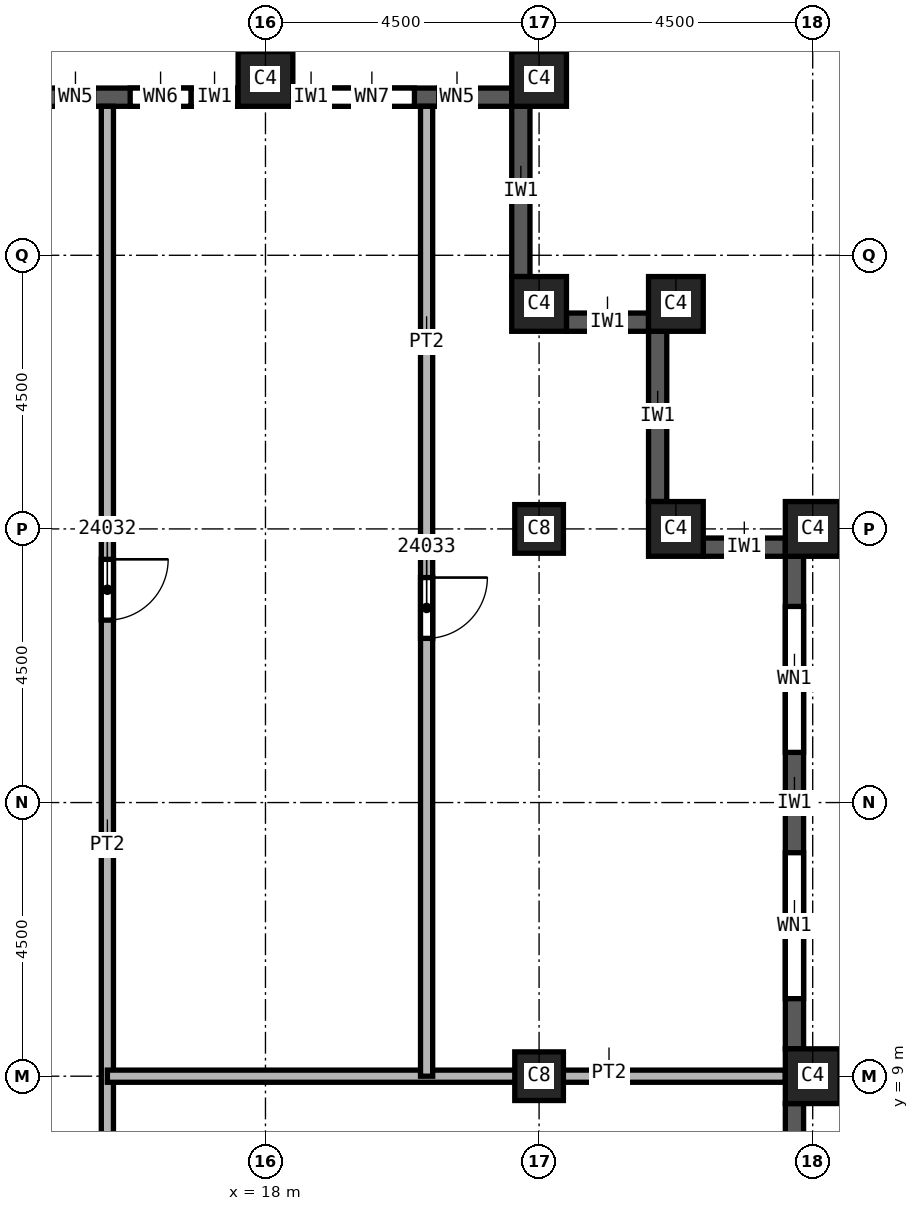
"""IFC4 building model, lengths in metres.
Left out: names, types, materials, properties, quantities, classifications, styles, units other than length and angle.
Written with IfcOpenShell. Run it as: python <this file> out.ifc"""

import sys

from ifc_helpers import new_model, si_unit, direction, frame, frame_2d, origin, origin_2d, place, context, subcontext, project, spatial, rectangle, extrude, element, fill, save


model = new_model("IFC4")
c1 = context("Model", 3, precision=1e-05, world=origin(), true_north=direction((0.0, 1.0)))
c2 = subcontext(c1, "Body", "Model", "MODEL_VIEW")
j1 = project(units=[si_unit("LENGTHUNIT", "METRE"), si_unit("PLANEANGLEUNIT", "RADIAN")], contexts=[c1])
p1 = place(None, origin())
s1 = spatial("IfcSite", under=j1, at=p1, CompositionType="ELEMENT")
p2 = place(p1, origin())
s2 = spatial("IfcBuilding", under=s1, at=p2, CompositionType="ELEMENT")
p3 = place(p2, frame((0.0, 0.0, 338.0)))
s3 = spatial("IfcBuildingStorey", under=s2, at=p3, CompositionType="ELEMENT", Elevation=338.0)
for number, where, z_axis, x_axis in (
    (1, (22.5, 9.0, 0.0), (0.0, 0.0, 1.0), (1.0, 0.0, 0.0)),
    (2, (22.5, 18.0, 0.0), (0.0, 0.0, 1.0), (1.0, 0.0, 0.0)),
):
    element("IfcColumn", number, at=place(p3, frame(where, z_axis=z_axis, x_axis=x_axis)), inside=s3, PredefinedType="COLUMN", context=c2, shape_type="SweptSolid", body=[
        extrude(rectangle(XDim=0.8, YDim=0.8, at=origin_2d()), origin(), (0.0, 0.0, 1.0), 3.74),
    ])
for number, where, z_axis, x_axis in (
    (3, (27.0, 9.0, 0.0), (0.0, 0.0, 1.0), (0.0, 1.0, 0.0)),
    (4, (27.0, 18.0, 0.0), (0.0, 0.0, 1.0), (0.0, 1.0, 0.0)),
    (5, (18.0, 25.4, 0.0), (0.0, 0.0, 1.0), (1.0, 0.0, 0.0)),
    (6, (22.5, 25.4, 0.0), (0.0, 0.0, 1.0), (1.0, 0.0, 0.0)),
    (7, (22.5, 21.7, 0.0), (0.0, 0.0, 1.0), (1.0, 0.0, 0.0)),
    (8, (24.75, 21.7, 0.0), (0.0, 0.0, 1.0), (1.0, 0.0, 0.0)),
    (9, (24.75, 18.0, 0.0), (0.0, 0.0, 1.0), (1.0, 0.0, 0.0)),
):
    element("IfcColumn", number, at=place(p3, frame(where, z_axis=z_axis, x_axis=x_axis)), inside=s3, PredefinedType="COLUMN", context=c2, shape_type="SweptSolid", body=[
        extrude(rectangle(XDim=0.9, YDim=0.9, at=origin_2d()), origin(), (0.0, 0.0, 1.0), 3.74),
    ])
p4 = place(p3, frame((26.7, 0.45, 0.0), z_axis=(0.0, 0.0, 1.0), x_axis=(0.0, 1.0, 0.0)))
e10 = element("IfcWall", 10, at=p4, inside=s3, PredefinedType="SOLIDWALL", context=c2, shape_type="SweptSolid", body=[
    extrude(rectangle(XDim=8.1, YDim=0.3, at=frame_2d((4.05, 0.0))), origin(), (0.0, 0.0, 1.0), 3.14),
])
p5 = place(p4, frame((0.825, 0.0, 0.8)))
e11 = element("IfcOpeningElement", 11, at=p5, cuts=e10, PredefinedType="OPENING", context=c2, shape_type="SweptSolid", body=[
    extrude(rectangle(XDim=2.4, YDim=1.95, at=frame_2d((1.2, 0.975))), frame((0.0, 0.15, 0.0), z_axis=(0.0, -1.0, 0.0), x_axis=(1.0, 0.0, 0.0)), (0.0, 0.0, 1.0), 0.3),
])
p6 = place(p4, frame((4.875, 0.0, 0.8)))
e12 = element("IfcOpeningElement", 12, at=p6, cuts=e10, PredefinedType="OPENING", context=c2, shape_type="SweptSolid", body=[
    extrude(rectangle(XDim=2.4, YDim=1.95, at=frame_2d((1.2, 0.975))), frame((0.0, 0.15, 0.0), z_axis=(0.0, -1.0, 0.0), x_axis=(1.0, 0.0, 0.0)), (0.0, 0.0, 1.0), 0.3),
])
p7 = place(p3, frame((26.7, 9.45, 0.0), z_axis=(0.0, 0.0, 1.0), x_axis=(0.0, 1.0, 0.0)))
e13 = element("IfcWall", 13, at=p7, inside=s3, PredefinedType="SOLIDWALL", context=c2, shape_type="SweptSolid", body=[
    extrude(rectangle(XDim=8.1, YDim=0.3, at=frame_2d((4.05, 0.0))), origin(), (0.0, 0.0, 1.0), 3.14),
])
p8 = place(p7, frame((0.825, 0.0, 0.8)))
e14 = element("IfcOpeningElement", 14, at=p8, cuts=e13, PredefinedType="OPENING", context=c2, shape_type="SweptSolid", body=[
    extrude(rectangle(XDim=2.4, YDim=1.95, at=frame_2d((1.2, 0.975))), frame((0.0, 0.15, 0.0), z_axis=(0.0, -1.0, 0.0), x_axis=(1.0, 0.0, 0.0)), (0.0, 0.0, 1.0), 0.3),
])
p9 = place(p7, frame((4.875, 0.0, 0.8)))
e15 = element("IfcOpeningElement", 15, at=p9, cuts=e13, PredefinedType="OPENING", context=c2, shape_type="SweptSolid", body=[
    extrude(rectangle(XDim=2.4, YDim=1.95, at=frame_2d((1.2, 0.975))), frame((0.0, 0.15, 0.0), z_axis=(0.0, -1.0, 0.0), x_axis=(1.0, 0.0, 0.0)), (0.0, 0.0, 1.0), 0.3),
])
p10 = place(p3, frame((26.55, 17.7, 0.0), z_axis=(0.0, 0.0, 1.0), x_axis=(-1.0, 0.0, 0.0)))
e16 = element("IfcWall", 16, at=p10, inside=s3, PredefinedType="SOLIDWALL", context=c2, shape_type="SweptSolid", body=[
    extrude(rectangle(XDim=1.35, YDim=0.3, at=frame_2d((0.675, 0.0))), origin(), (0.0, 0.0, 1.0), 3.14),
])
p11 = place(p3, frame((24.45, 18.45, 0.0), z_axis=(0.0, 0.0, 1.0), x_axis=(0.0, 1.0, 0.0)))
e17 = element("IfcWall", 17, at=p11, inside=s3, PredefinedType="SOLIDWALL", context=c2, shape_type="SweptSolid", body=[
    extrude(rectangle(XDim=2.8, YDim=0.3, at=frame_2d((1.4, 0.0))), origin(), (0.0, 0.0, 1.0), 3.14),
])
p12 = place(p3, frame((24.3, 21.4, 0.0), z_axis=(0.0, 0.0, 1.0), x_axis=(-1.0, 0.0, 0.0)))
e18 = element("IfcWall", 18, at=p12, inside=s3, PredefinedType="SOLIDWALL", context=c2, shape_type="SweptSolid", body=[
    extrude(rectangle(XDim=1.35, YDim=0.3, at=frame_2d((0.675, 0.0))), origin(), (0.0, 0.0, 1.0), 3.14),
])
p13 = place(p3, frame((22.2, 22.15, 0.0), z_axis=(0.0, 0.0, 1.0), x_axis=(0.0, 1.0, 0.0)))
e19 = element("IfcWall", 19, at=p13, inside=s3, PredefinedType="SOLIDWALL", context=c2, shape_type="SweptSolid", body=[
    extrude(rectangle(XDim=2.8, YDim=0.3, at=frame_2d((1.4, 0.0))), origin(), (0.0, 0.0, 1.0), 3.14),
])
p14 = place(p3, frame((22.05, 25.1, 0.0), z_axis=(0.0, 0.0, 1.0), x_axis=(-1.0, 0.0, 0.0)))
e20 = element("IfcWall", 20, at=p14, inside=s3, PredefinedType="SOLIDWALL", context=c2, shape_type="SweptSolid", body=[
    extrude(rectangle(XDim=3.6, YDim=0.3, at=frame_2d((1.8, 0.0))), origin(), (0.0, 0.0, 1.0), 3.14),
])
p15 = place(p14, frame((0.6, 0.0, 0.8)))
e21 = element("IfcOpeningElement", 21, at=p15, cuts=e20, PredefinedType="OPENING", context=c2, shape_type="SweptSolid", body=[
    extrude(rectangle(XDim=0.6, YDim=1.95, at=frame_2d((0.3, 0.975))), frame((0.0, 0.15, 0.0), z_axis=(0.0, -1.0, 0.0), x_axis=(1.0, 0.0, 0.0)), (0.0, 0.0, 1.0), 0.3),
])
p16 = place(p14, frame((1.6, 0.0, 0.8)))
e22 = element("IfcOpeningElement", 22, at=p16, cuts=e20, PredefinedType="OPENING", context=c2, shape_type="SweptSolid", body=[
    extrude(rectangle(XDim=1.4, YDim=1.95, at=frame_2d((0.7, 0.975))), frame((0.0, 0.15, 0.0), z_axis=(0.0, -1.0, 0.0), x_axis=(1.0, 0.0, 0.0)), (0.0, 0.0, 1.0), 0.3),
])
p17 = place(p3, frame((17.55, 25.1, 0.0), z_axis=(0.0, 0.0, 1.0), x_axis=(-1.0, 0.0, 0.0)))
e23 = element("IfcWall", 23, at=p17, inside=s3, PredefinedType="SOLIDWALL", context=c2, shape_type="SweptSolid", body=[
    extrude(rectangle(XDim=3.6, YDim=0.3, at=frame_2d((1.8, 0.0))), origin(), (0.0, 0.0, 1.0), 3.14),
])
p18 = place(p17, frame((0.775, 0.0, 0.8)))
e24 = element("IfcOpeningElement", 24, at=p18, cuts=e23, PredefinedType="OPENING", context=c2, shape_type="SweptSolid", body=[
    extrude(rectangle(XDim=1.0, YDim=1.95, at=frame_2d((0.5, 0.975))), frame((0.0, 0.15, 0.0), z_axis=(0.0, -1.0, 0.0), x_axis=(1.0, 0.0, 0.0)), (0.0, 0.0, 1.0), 0.3),
])
p19 = place(p17, frame((2.375, 0.0, 0.8)))
e25 = element("IfcOpeningElement", 25, at=p19, cuts=e23, PredefinedType="OPENING", context=c2, shape_type="SweptSolid", body=[
    extrude(rectangle(XDim=0.6, YDim=1.95, at=frame_2d((0.3, 0.975))), frame((0.0, 0.15, 0.0), z_axis=(0.0, -1.0, 0.0), x_axis=(1.0, 0.0, 0.0)), (0.0, 0.0, 1.0), 0.3),
])
p20 = place(p3, frame((15.4, 24.95, 0.0), z_axis=(0.0, 0.0, 1.0), x_axis=(0.0, -1.0, 0.0)))
e26 = element("IfcWall", 26, at=p20, inside=s3, PredefinedType="PARTITIONING", context=c2, shape_type="SweptSolid", body=[
    extrude(rectangle(XDim=49.9, YDim=0.2, at=frame_2d((24.95, 0.0))), origin(), (0.0, 0.0, 1.0), 3.74),
])
p21 = place(p20, frame((23.75, 0.0, 0.0)))
e27 = element("IfcOpeningElement", 27, at=p21, cuts=e26, PredefinedType="OPENING", context=c2, shape_type="SweptSolid", body=[
    extrude(rectangle(XDim=1.0, YDim=2.1, at=frame_2d((0.5, 1.05))), frame((0.0, 0.1, 0.0), z_axis=(0.0, -1.0, 0.0), x_axis=(1.0, 0.0, 0.0)), (0.0, 0.0, 1.0), 0.2),
])
p22 = place(p20, frame((18.65, 0.0, 0.0)))
e28 = element("IfcOpeningElement", 28, at=p22, cuts=e26, PredefinedType="OPENING", context=c2, shape_type="SweptSolid", body=[
    extrude(rectangle(XDim=1.0, YDim=2.1, at=frame_2d((0.5, 1.05))), frame((0.0, 0.1, 0.0), z_axis=(0.0, -1.0, 0.0), x_axis=(1.0, 0.0, 0.0)), (0.0, 0.0, 1.0), 0.2),
])
p23 = place(p20, frame((7.45, 0.0, 0.0)))
e29 = element("IfcOpeningElement", 29, at=p23, cuts=e26, PredefinedType="OPENING", context=c2, shape_type="SweptSolid", body=[
    extrude(rectangle(XDim=1.0, YDim=2.1, at=frame_2d((0.5, 1.05))), frame((0.0, 0.1, 0.0), z_axis=(0.0, -1.0, 0.0), x_axis=(1.0, 0.0, 0.0)), (0.0, 0.0, 1.0), 0.2),
])
p24 = place(p20, frame((44.15, 0.0, 0.0)))
e30 = element("IfcOpeningElement", 30, at=p24, cuts=e26, PredefinedType="OPENING", context=c2, shape_type="SweptSolid", body=[
    extrude(rectangle(XDim=1.0, YDim=2.1, at=frame_2d((0.5, 1.05))), frame((0.0, 0.1, 0.0), z_axis=(0.0, -1.0, 0.0), x_axis=(1.0, 0.0, 0.0)), (0.0, 0.0, 1.0), 0.2),
])
p25 = place(p20, frame((38.6, 0.0, 0.0)))
e31 = element("IfcOpeningElement", 31, at=p25, cuts=e26, PredefinedType="OPENING", context=c2, shape_type="SweptSolid", body=[
    extrude(rectangle(XDim=1.0, YDim=2.1, at=frame_2d((0.5, 1.05))), frame((0.0, 0.1, 0.0), z_axis=(0.0, -1.0, 0.0), x_axis=(1.0, 0.0, 0.0)), (0.0, 0.0, 1.0), 0.2),
])
p26 = place(p20, frame((37.25, 0.0, 0.0)))
e32 = element("IfcOpeningElement", 32, at=p26, cuts=e26, PredefinedType="OPENING", context=c2, shape_type="SweptSolid", body=[
    extrude(rectangle(XDim=1.0, YDim=2.1, at=frame_2d((0.5, 1.05))), frame((0.0, 0.1, 0.0), z_axis=(0.0, -1.0, 0.0), x_axis=(1.0, 0.0, 0.0)), (0.0, 0.0, 1.0), 0.2),
])
p27 = place(p20, frame((32.75, 0.0, 0.0)))
e33 = element("IfcOpeningElement", 33, at=p27, cuts=e26, PredefinedType="OPENING", context=c2, shape_type="SweptSolid", body=[
    extrude(rectangle(XDim=1.0, YDim=2.1, at=frame_2d((0.5, 1.05))), frame((0.0, 0.1, 0.0), z_axis=(0.0, -1.0, 0.0), x_axis=(1.0, 0.0, 0.0)), (0.0, 0.0, 1.0), 0.2),
])
p28 = place(p20, frame((27.65, 0.0, 0.0)))
e34 = element("IfcOpeningElement", 34, at=p28, cuts=e26, PredefinedType="OPENING", context=c2, shape_type="SweptSolid", body=[
    extrude(rectangle(XDim=1.0, YDim=2.1, at=frame_2d((0.5, 1.05))), frame((0.0, 0.1, 0.0), z_axis=(0.0, -1.0, 0.0), x_axis=(1.0, 0.0, 0.0)), (0.0, 0.0, 1.0), 0.2),
])
p29 = place(p3, frame((15.4, 9.0, 0.0), z_axis=(0.0, 0.0, 1.0), x_axis=(1.0, 0.0, 0.0)))
e35 = element("IfcWall", 35, at=p29, inside=s3, PredefinedType="PARTITIONING", context=c2, shape_type="SweptSolid", body=[
    extrude(rectangle(XDim=11.15, YDim=0.2, at=frame_2d((5.575, 0.0))), origin(), (0.0, 0.0, 1.0), 3.74),
])
p30 = place(p3, frame((20.65, 24.95, 0.0), z_axis=(0.0, 0.0, 1.0), x_axis=(0.0, -1.0, 0.0)))
e36 = element("IfcWall", 36, at=p30, inside=s3, PredefinedType="PARTITIONING", context=c2, shape_type="SweptSolid", body=[
    extrude(rectangle(XDim=15.95, YDim=0.2, at=frame_2d((7.975, 0.0))), origin(), (0.0, 0.0, 1.0), 3.74),
])
p31 = place(p30, frame((7.75, 0.0, 0.0)))
e37 = element("IfcOpeningElement", 37, at=p31, cuts=e36, PredefinedType="OPENING", context=c2, shape_type="SweptSolid", body=[
    extrude(rectangle(XDim=1.0, YDim=2.1, at=frame_2d((0.5, 1.05))), frame((0.0, 0.1, 0.0), z_axis=(0.0, -1.0, 0.0), x_axis=(1.0, 0.0, 0.0)), (0.0, 0.0, 1.0), 0.2),
])
p32 = place(p8, origin())
e38 = element("IfcWindow", 38, at=p32, inside=s3, PartitioningType="SINGLE_PANEL", PredefinedType="WINDOW", context=c2, shape_type="SweptSolid", body=[
    extrude(rectangle(XDim=2.4, YDim=1.95, at=frame_2d((1.2, 0.975))), frame((0.0, 0.03, 0.0), z_axis=(0.0, -1.0, 0.0), x_axis=(1.0, 0.0, 0.0)), (0.0, 0.0, 1.0), 0.06),
])
fill(e14, e38)
p33 = place(p9, origin())
e39 = element("IfcWindow", 39, at=p33, inside=s3, PartitioningType="SINGLE_PANEL", PredefinedType="WINDOW", context=c2, shape_type="SweptSolid", body=[
    extrude(rectangle(XDim=2.4, YDim=1.95, at=frame_2d((1.2, 0.975))), frame((0.0, 0.03, 0.0), z_axis=(0.0, -1.0, 0.0), x_axis=(1.0, 0.0, 0.0)), (0.0, 0.0, 1.0), 0.06),
])
fill(e15, e39)
p34 = place(p23, origin())
e40 = element("IfcDoor", 40, at=p34, inside=s3, OperationType="SINGLE_SWING_LEFT", PredefinedType="DOOR", context=c2, shape_type="SweptSolid", body=[
    extrude(rectangle(XDim=1.0, YDim=2.1, at=frame_2d((0.5, 1.05))), frame((0.0, 0.025, 0.0), z_axis=(0.0, -1.0, 0.0), x_axis=(1.0, 0.0, 0.0)), (0.0, 0.0, 1.0), 0.05),
])
fill(e29, e40)
p35 = place(p31, origin())
e41 = element("IfcDoor", 41, at=p35, inside=s3, OperationType="SINGLE_SWING_RIGHT", PredefinedType="DOOR", context=c2, shape_type="SweptSolid", body=[
    extrude(rectangle(XDim=1.0, YDim=2.1, at=frame_2d((0.5, 1.05))), frame((0.0, 0.025, 0.0), z_axis=(0.0, -1.0, 0.0), x_axis=(1.0, 0.0, 0.0)), (0.0, 0.0, 1.0), 0.05),
])
fill(e37, e41)
p36 = place(p15, origin())
e42 = element("IfcWindow", 42, at=p36, inside=s3, PartitioningType="SINGLE_PANEL", PredefinedType="WINDOW", context=c2, shape_type="SweptSolid", body=[
    extrude(rectangle(XDim=0.6, YDim=1.95, at=frame_2d((0.3, 0.975))), frame((0.0, 0.03, 0.0), z_axis=(0.0, -1.0, 0.0), x_axis=(1.0, 0.0, 0.0)), (0.0, 0.0, 1.0), 0.06),
])
fill(e21, e42)
p37 = place(p16, origin())
e43 = element("IfcWindow", 43, at=p37, inside=s3, PartitioningType="SINGLE_PANEL", PredefinedType="WINDOW", context=c2, shape_type="SweptSolid", body=[
    extrude(rectangle(XDim=1.4, YDim=1.95, at=frame_2d((0.7, 0.975))), frame((0.0, 0.03, 0.0), z_axis=(0.0, -1.0, 0.0), x_axis=(1.0, 0.0, 0.0)), (0.0, 0.0, 1.0), 0.06),
])
fill(e22, e43)
p38 = place(p18, origin())
e44 = element("IfcWindow", 44, at=p38, inside=s3, PartitioningType="SINGLE_PANEL", PredefinedType="WINDOW", context=c2, shape_type="SweptSolid", body=[
    extrude(rectangle(XDim=1.0, YDim=1.95, at=frame_2d((0.5, 0.975))), frame((0.0, 0.03, 0.0), z_axis=(0.0, -1.0, 0.0), x_axis=(1.0, 0.0, 0.0)), (0.0, 0.0, 1.0), 0.06),
])
fill(e24, e44)
p39 = place(p19, origin())
e45 = element("IfcWindow", 45, at=p39, inside=s3, PartitioningType="SINGLE_PANEL", PredefinedType="WINDOW", context=c2, shape_type="SweptSolid", body=[
    extrude(rectangle(XDim=0.6, YDim=1.95, at=frame_2d((0.3, 0.975))), frame((0.0, 0.03, 0.0), z_axis=(0.0, -1.0, 0.0), x_axis=(1.0, 0.0, 0.0)), (0.0, 0.0, 1.0), 0.06),
])
fill(e25, e45)
save(model, sys.argv[1])
